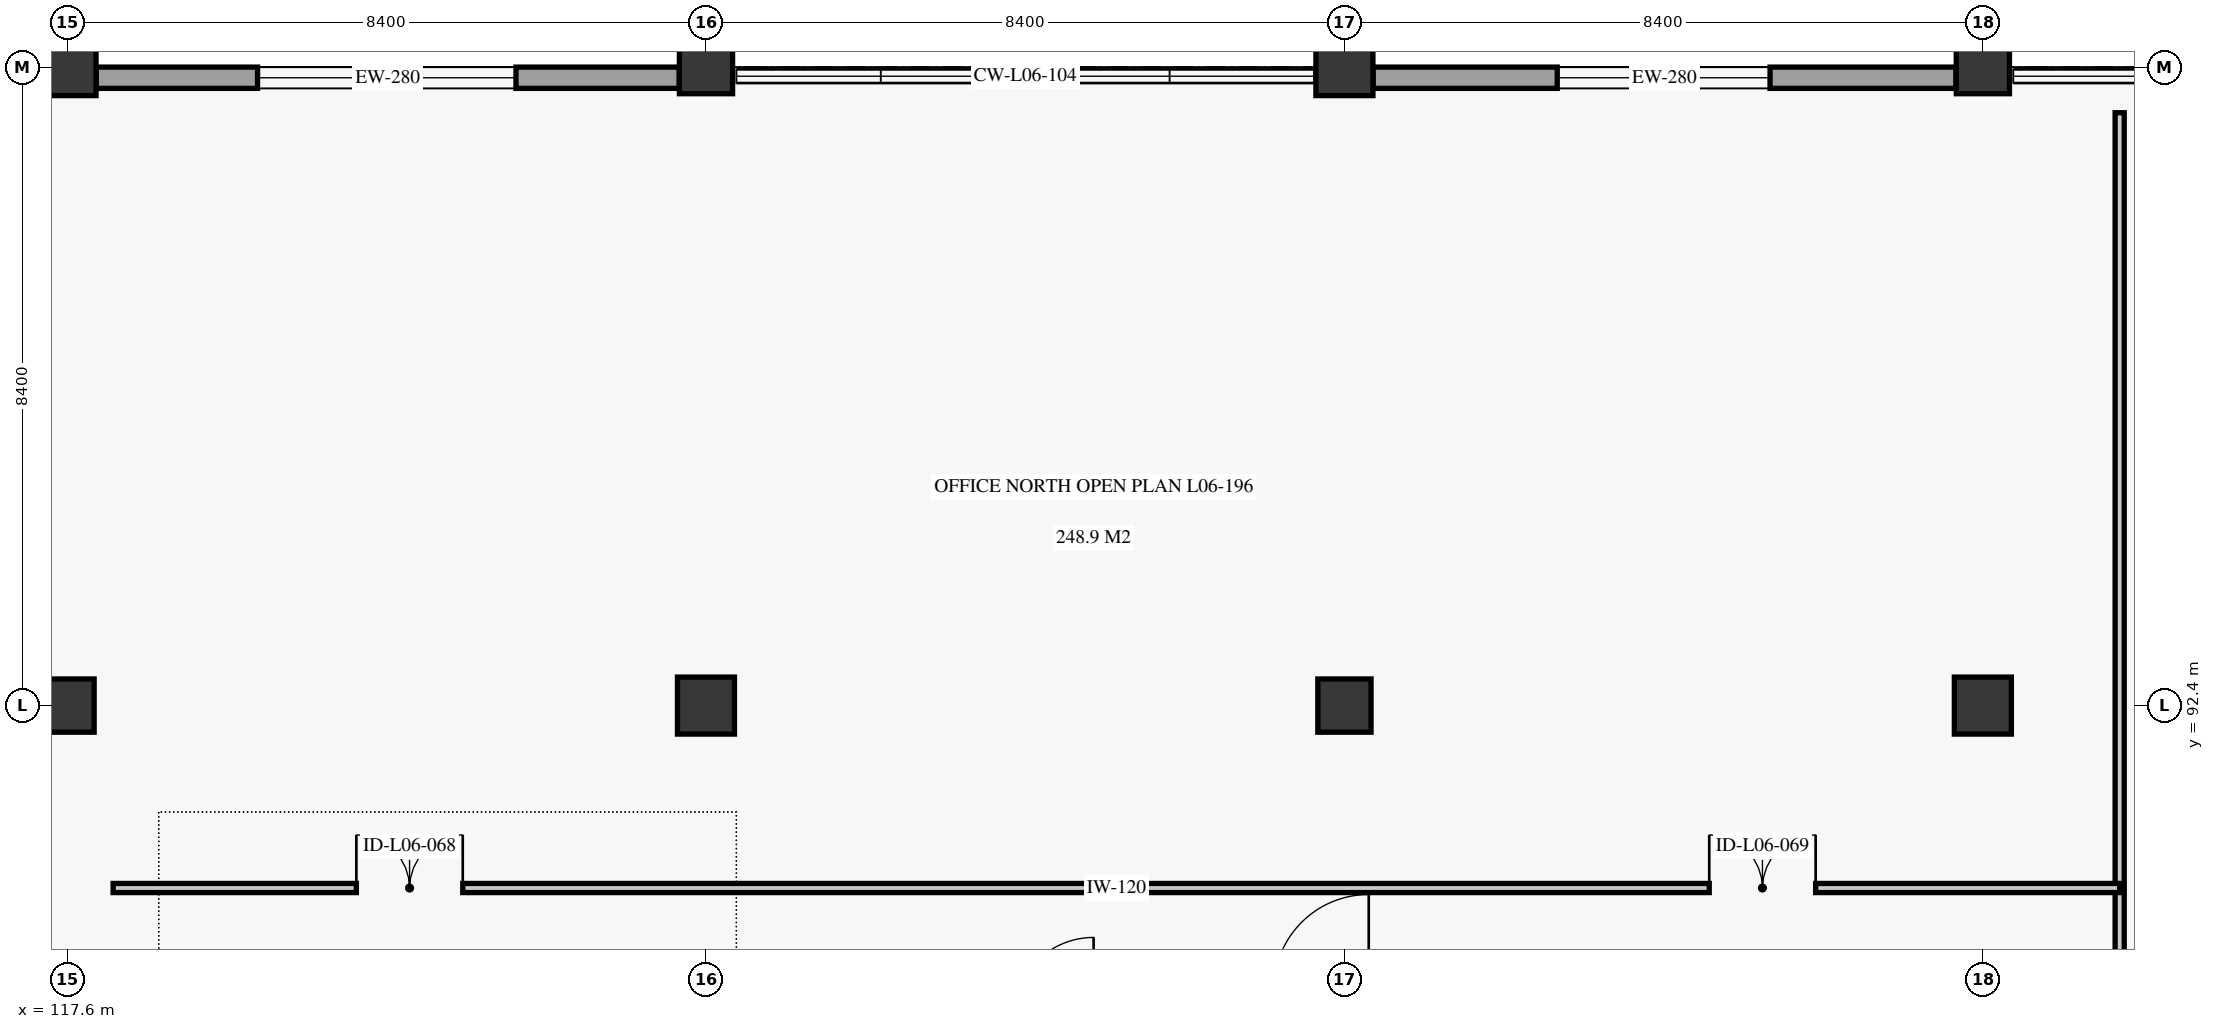
"""IFC4 building model, lengths in metres.
Left out: names, types, materials, properties, quantities, classifications, styles, units other than length and angle.
Written with IfcOpenShell. Run it as: python <this file> out.ifc"""

import sys

from ifc_helpers import new_model, si_unit, direction, frame, frame_2d, origin, origin_2d, place, context, subcontext, project, spatial, rectangle, extrude, element, fill, save


model = new_model("IFC4")
c1 = context("Model", 3, precision=1e-05, world=origin(), true_north=direction((0.0, 1.0)))
c2 = subcontext(c1, "Body", "Model", "MODEL_VIEW")
j1 = project(units=[si_unit("LENGTHUNIT", "METRE"), si_unit("PLANEANGLEUNIT", "RADIAN")], contexts=[c1])
p1 = place(None, origin())
s1 = spatial("IfcSite", under=j1, at=p1, CompositionType="ELEMENT")
p2 = place(p1, origin())
s2 = spatial("IfcBuilding", under=s1, at=p2, CompositionType="ELEMENT")
p3 = place(p2, frame((0.0, 0.0, 26.7)))
s3 = spatial("IfcBuildingStorey", under=s2, at=p3, CompositionType="ELEMENT", Elevation=26.7)
p4 = place(p3, frame((117.6, 92.4, 0.0), z_axis=(0.0, 0.0, 1.0), x_axis=(1.0, 0.0, 0.0)))
e1 = element("IfcColumn", 1, at=p4, inside=s3, PredefinedType="COLUMN", context=c2, shape_type="SweptSolid", body=[
    extrude(rectangle(XDim=0.7, YDim=0.7, at=origin_2d()), origin(), (0.0, 0.0, 1.0), 3.72),
])
for number, where, z_axis, x_axis in (
    (2, (117.6, 100.8, 0.0), (0.0, 0.0, 1.0), (1.0, 0.0, 0.0)),
    (3, (126.0, 92.4, 0.0), (0.0, 0.0, 1.0), (1.0, 0.0, 0.0)),
):
    element("IfcColumn", number, at=place(p3, frame(where, z_axis=z_axis, x_axis=x_axis)), inside=s3, PredefinedType="COLUMN", context=c2, shape_type="SweptSolid", body=[
        extrude(rectangle(XDim=0.75, YDim=0.75, at=origin_2d()), origin(), (0.0, 0.0, 1.0), 3.72),
    ])
for number, where, z_axis, x_axis in (
    (4, (126.0, 100.8, 0.0), (0.0, 0.0, 1.0), (1.0, 0.0, 0.0)),
    (5, (134.4, 92.4, 0.0), (0.0, 0.0, 1.0), (1.0, 0.0, 0.0)),
):
    element("IfcColumn", number, at=place(p3, frame(where, z_axis=z_axis, x_axis=x_axis)), inside=s3, PredefinedType="COLUMN", context=c2, shape_type="SweptSolid", body=[
        extrude(rectangle(XDim=0.7, YDim=0.7, at=origin_2d()), origin(), (0.0, 0.0, 1.0), 3.72),
    ])
for number, where, z_axis, x_axis in (
    (6, (134.4, 100.8, 0.0), (0.0, 0.0, 1.0), (1.0, 0.0, 0.0)),
    (7, (142.8, 92.4, 0.0), (0.0, 0.0, 1.0), (1.0, 0.0, 0.0)),
):
    element("IfcColumn", number, at=place(p3, frame(where, z_axis=z_axis, x_axis=x_axis)), inside=s3, PredefinedType="COLUMN", context=c2, shape_type="SweptSolid", body=[
        extrude(rectangle(XDim=0.75, YDim=0.75, at=origin_2d()), origin(), (0.0, 0.0, 1.0), 3.72),
    ])
p5 = place(p3, frame((142.8, 100.8, 0.0), z_axis=(0.0, 0.0, 1.0), x_axis=(1.0, 0.0, 0.0)))
e8 = element("IfcColumn", 8, at=p5, inside=s3, PredefinedType="COLUMN", context=c2, shape_type="SweptSolid", body=[
    extrude(rectangle(XDim=0.7, YDim=0.7, at=origin_2d()), origin(), (0.0, 0.0, 1.0), 3.72),
])
p6 = place(p3, frame((117.978, 100.66, 0.0), z_axis=(0.0, 0.0, 1.0), x_axis=(1.0, 0.0, 0.0)))
e9 = element("IfcWall", 9, at=p6, inside=s3, PredefinedType="SOLIDWALL", context=c2, shape_type="SweptSolid", body=[
    extrude(rectangle(XDim=7.67, YDim=0.28, at=frame_2d((3.835, 0.0))), origin(), (0.0, 0.0, 1.0), 3.04),
])
p7 = place(p6, frame((2.122, 0.0, 0.85)))
e10 = element("IfcOpeningElement", 10, at=p7, cuts=e9, PredefinedType="OPENING", context=c2, shape_type="SweptSolid", body=[
    extrude(rectangle(XDim=3.4, YDim=1.9, at=frame_2d((1.7, 0.95))), frame((0.0, 0.15, 0.0), z_axis=(0.0, -1.0, 0.0), x_axis=(1.0, 0.0, 0.0)), (0.0, 0.0, 1.0), 0.3),
])
p8 = place(p3, frame((134.778, 100.66, 0.0), z_axis=(0.0, 0.0, 1.0), x_axis=(1.0, 0.0, 0.0)))
e11 = element("IfcWall", 11, at=p8, inside=s3, PredefinedType="SOLIDWALL", context=c2, shape_type="SweptSolid", body=[
    extrude(rectangle(XDim=7.668, YDim=0.28, at=frame_2d((3.834, 0.0))), origin(), (0.0, 0.0, 1.0), 3.04),
])
p9 = place(p8, frame((2.422, 0.0, 0.85)))
e12 = element("IfcOpeningElement", 12, at=p9, cuts=e11, PredefinedType="OPENING", context=c2, shape_type="SweptSolid", body=[
    extrude(rectangle(XDim=2.8, YDim=1.85, at=frame_2d((1.4, 0.925))), frame((0.0, 0.15, 0.0), z_axis=(0.0, -1.0, 0.0), x_axis=(1.0, 0.0, 0.0)), (0.0, 0.0, 1.0), 0.3),
])
p10 = place(p3, frame((144.6, 67.8, 0.0), z_axis=(0.0, 0.0, 1.0), x_axis=(0.0, 1.0, 0.0)))
e13 = element("IfcWall", 13, at=p10, inside=s3, PredefinedType="PARTITIONING", context=c2, shape_type="SweptSolid", body=[
    extrude(rectangle(XDim=32.4, YDim=0.12, at=frame_2d((16.2, 0.0))), origin(), (0.0, 0.0, 1.0), 3.34),
])
p11 = place(p10, frame((4.2, 0.0, 0.0)))
e14 = element("IfcOpeningElement", 14, at=p11, cuts=e13, PredefinedType="OPENING", context=c2, shape_type="SweptSolid", body=[
    extrude(rectangle(XDim=1.1, YDim=2.15, at=frame_2d((0.55, 1.075))), frame((0.0, 0.07, 0.0), z_axis=(0.0, -1.0, 0.0), x_axis=(1.0, 0.0, 0.0)), (0.0, 0.0, 1.0), 0.14),
])
p12 = place(p10, frame((18.0, 0.0, 0.0)))
e15 = element("IfcOpeningElement", 15, at=p12, cuts=e13, PredefinedType="OPENING", context=c2, shape_type="SweptSolid", body=[
    extrude(rectangle(XDim=1.1, YDim=2.15, at=frame_2d((0.55, 1.075))), frame((0.0, 0.07, 0.0), z_axis=(0.0, -1.0, 0.0), x_axis=(1.0, 0.0, 0.0)), (0.0, 0.0, 1.0), 0.14),
])
p13 = place(p3, frame((118.2, 90.0, 0.0), z_axis=(0.0, 0.0, 1.0), x_axis=(1.0, 0.0, 0.0)))
e16 = element("IfcWall", 16, at=p13, inside=s3, PredefinedType="PARTITIONING", context=c2, shape_type="SweptSolid", body=[
    extrude(rectangle(XDim=26.4, YDim=0.12, at=frame_2d((13.2, 0.0))), origin(), (0.0, 0.0, 1.0), 3.34),
])
p14 = place(p13, frame((3.2, 0.0, 0.0)))
e17 = element("IfcOpeningElement", 17, at=p14, cuts=e16, PredefinedType="OPENING", context=c2, shape_type="SweptSolid", body=[
    extrude(rectangle(XDim=1.4, YDim=2.35, at=frame_2d((0.7, 1.175))), frame((0.0, 0.07, 0.0), z_axis=(0.0, -1.0, 0.0), x_axis=(1.0, 0.0, 0.0)), (0.0, 0.0, 1.0), 0.14),
])
p15 = place(p13, frame((21.0, 0.0, 0.0)))
e18 = element("IfcOpeningElement", 18, at=p15, cuts=e16, PredefinedType="OPENING", context=c2, shape_type="SweptSolid", body=[
    extrude(rectangle(XDim=1.4, YDim=2.35, at=frame_2d((0.7, 1.175))), frame((0.0, 0.07, 0.0), z_axis=(0.0, -1.0, 0.0), x_axis=(1.0, 0.0, 0.0)), (0.0, 0.0, 1.0), 0.14),
])
p16 = place(p7, origin())
e19 = element("IfcWindow", 19, at=p16, inside=s3, PartitioningType="SINGLE_PANEL", PredefinedType="WINDOW", context=c2, shape_type="SweptSolid", body=[
    extrude(rectangle(XDim=3.4, YDim=1.9, at=frame_2d((1.7, 0.95))), frame((0.0, 0.03, 0.0), z_axis=(0.0, -1.0, 0.0), x_axis=(1.0, 0.0, 0.0)), (0.0, 0.0, 1.0), 0.06),
])
fill(e10, e19)
p17 = place(p9, origin())
e20 = element("IfcWindow", 20, at=p17, inside=s3, PartitioningType="SINGLE_PANEL", PredefinedType="WINDOW", context=c2, shape_type="SweptSolid", body=[
    extrude(rectangle(XDim=2.8, YDim=1.85, at=frame_2d((1.4, 0.925))), frame((0.0, 0.03, 0.0), z_axis=(0.0, -1.0, 0.0), x_axis=(1.0, 0.0, 0.0)), (0.0, 0.0, 1.0), 0.06),
])
fill(e12, e20)
p18 = place(p14, origin())
e21 = element("IfcDoor", 21, at=p18, inside=s3, OperationType="DOUBLE_DOOR_SINGLE_SWING", PredefinedType="DOOR", context=c2, shape_type="SweptSolid", body=[
    extrude(rectangle(XDim=1.4, YDim=2.35, at=frame_2d((0.7, 1.175))), frame((0.0, 0.025, 0.0), z_axis=(0.0, -1.0, 0.0), x_axis=(1.0, 0.0, 0.0)), (0.0, 0.0, 1.0), 0.05),
])
fill(e17, e21)
p19 = place(p15, origin())
e22 = element("IfcDoor", 22, at=p19, inside=s3, OperationType="DOUBLE_DOOR_SINGLE_SWING", PredefinedType="DOOR", context=c2, shape_type="SweptSolid", body=[
    extrude(rectangle(XDim=1.4, YDim=2.35, at=frame_2d((0.7, 1.175))), frame((0.0, 0.025, 0.0), z_axis=(0.0, -1.0, 0.0), x_axis=(1.0, 0.0, 0.0)), (0.0, 0.0, 1.0), 0.05),
])
fill(e18, e22)
save(model, sys.argv[1])
